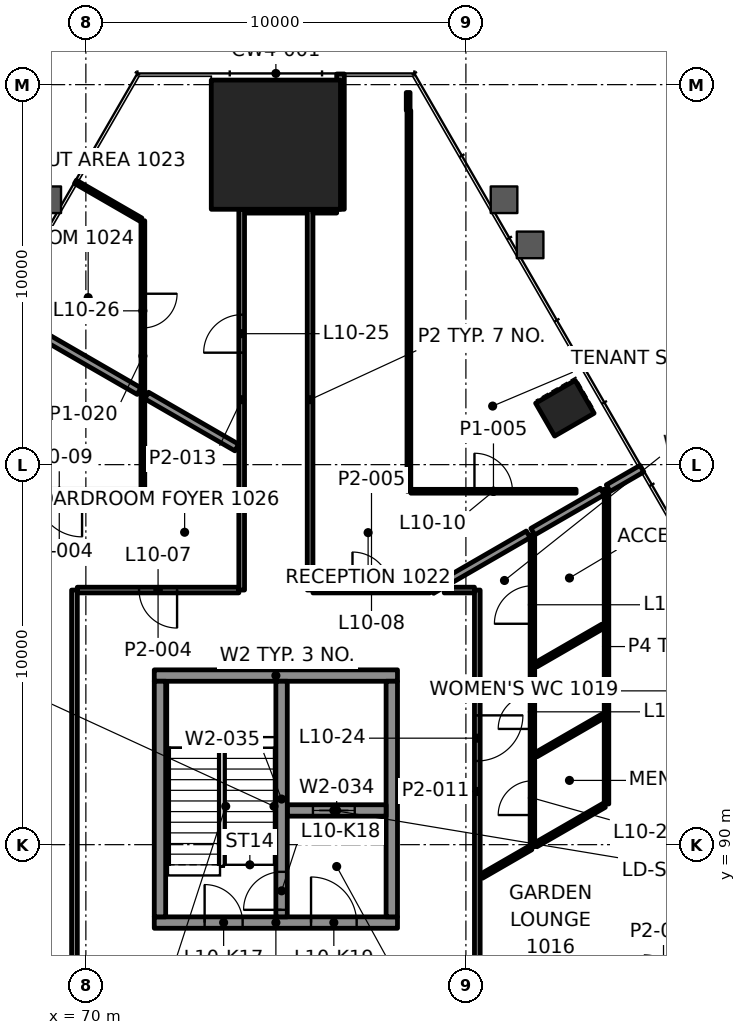
"""IFC4 building model, lengths in metres.
Left out: names, types, materials, properties, quantities, classifications, styles, units other than length and angle.
Written with IfcOpenShell. Run it as: python <this file> out.ifc"""

import sys

from ifc_helpers import new_model, si_unit, direction, frame, frame_2d, origin, origin_2d, place, context, subcontext, project, spatial, rectangle, extrude, element, fill, save


model = new_model("IFC4")
c1 = context("Model", 3, precision=1e-05, world=origin(), true_north=direction((0.0, 1.0)))
c2 = subcontext(c1, "Body", "Model", "MODEL_VIEW")
j1 = project(units=[si_unit("LENGTHUNIT", "METRE"), si_unit("PLANEANGLEUNIT", "RADIAN")], contexts=[c1])
p1 = place(None, origin())
s1 = spatial("IfcSite", under=j1, at=p1, CompositionType="ELEMENT")
p2 = place(p1, origin())
s2 = spatial("IfcBuilding", under=s1, at=p2, CompositionType="ELEMENT")
p3 = place(p2, frame((0.0, 0.0, 48.4)))
s3 = spatial("IfcBuildingStorey", under=s2, at=p3, CompositionType="ELEMENT", Elevation=48.4)
p4 = place(p3, frame((75.0, 108.42, 0.0), z_axis=(0.0, 0.0, 1.0), x_axis=(-1.0, 0.0, 0.0)))
e1 = element("IfcColumn", 1, at=p4, inside=s3, PredefinedType="COLUMN", context=c2, shape_type="SweptSolid", body=[
    extrude(rectangle(XDim=3.4, YDim=3.4, at=origin_2d()), origin(), (0.0, 0.0, 1.0), 4.2),
])
p5 = place(p3, frame((82.604, 101.485, -0.0), z_axis=(0.0, 0.0, 1.0), x_axis=(-0.5, 0.866025403784, 0.0)))
e2 = element("IfcColumn", 2, at=p5, inside=s3, PredefinedType="COLUMN", context=c2, shape_type="SweptSolid", body=[
    extrude(rectangle(XDim=1.0, YDim=1.2, at=origin_2d()), origin(), (0.0, 0.0, 1.0), 4.2),
])
p6 = place(p3, frame((71.8, 87.95, 0.0), z_axis=(0.0, 0.0, 1.0), x_axis=(1.0, 0.0, 0.0)))
e3 = element("IfcWall", 3, at=p6, inside=s3, PredefinedType="SHEAR", context=c2, shape_type="SweptSolid", body=[
    extrude(rectangle(XDim=6.4, YDim=0.3, at=frame_2d((3.2, 0.0))), origin(), (0.0, 0.0, 1.0), 4.0),
])
p7 = place(p6, frame((1.325, 0.0, 0.0)))
e4 = element("IfcOpeningElement", 4, at=p7, cuts=e3, PredefinedType="OPENING", context=c2, shape_type="SweptSolid", body=[
    extrude(rectangle(XDim=1.0, YDim=2.1, at=frame_2d((0.5, 1.05))), frame((0.0, 0.16, 0.0), z_axis=(0.0, -1.0, 0.0), x_axis=(1.0, 0.0, 0.0)), (0.0, 0.0, 1.0), 0.32),
])
p8 = place(p6, frame((4.125, 0.0, 0.0)))
e5 = element("IfcOpeningElement", 5, at=p8, cuts=e3, PredefinedType="OPENING", context=c2, shape_type="SweptSolid", body=[
    extrude(rectangle(XDim=1.2, YDim=2.1, at=frame_2d((0.6, 1.05))), frame((0.0, 0.16, 0.0), z_axis=(0.0, -1.0, 0.0), x_axis=(1.0, 0.0, 0.0)), (0.0, 0.0, 1.0), 0.32),
])
p9 = place(p3, frame((71.8, 94.45, 0.0), z_axis=(0.0, 0.0, 1.0), x_axis=(1.0, 0.0, 0.0)))
e6 = element("IfcWall", 6, at=p9, inside=s3, PredefinedType="SHEAR", context=c2, shape_type="SweptSolid", body=[
    extrude(rectangle(XDim=6.4, YDim=0.3, at=frame_2d((3.2, 0.0))), origin(), (0.0, 0.0, 1.0), 4.0),
])
for number, where, z_axis, x_axis in (
    (7, (71.95, 88.1, 0.0), (0.0, 0.0, 1.0), (0.0, 1.0, 0.0)),
    (8, (78.05, 88.1, 0.0), (0.0, 0.0, 1.0), (0.0, 1.0, 0.0)),
):
    element("IfcWall", number, at=place(p3, frame(where, z_axis=z_axis, x_axis=x_axis)), inside=s3, PredefinedType="SHEAR", context=c2, shape_type="SweptSolid", body=[
        extrude(rectangle(XDim=6.2, YDim=0.3, at=frame_2d((3.1, 0.0))), origin(), (0.0, 0.0, 1.0), 4.0),
    ])
p10 = place(p3, frame((75.3, 90.9, 0.0), z_axis=(0.0, 0.0, 1.0), x_axis=(1.0, 0.0, 0.0)))
e9 = element("IfcWall", 9, at=p10, inside=s3, PredefinedType="SHEAR", context=c2, shape_type="SweptSolid", body=[
    extrude(rectangle(XDim=2.6, YDim=0.3, at=frame_2d((1.3, 0.0))), origin(), (0.0, 0.0, 1.0), 4.0),
])
p11 = place(p10, frame((0.675, 0.0, 0.0)))
e10 = element("IfcOpeningElement", 10, at=p11, cuts=e9, PredefinedType="OPENING", context=c2, shape_type="SweptSolid", body=[
    extrude(rectangle(XDim=1.1, YDim=2.1, at=frame_2d((0.55, 1.05))), frame((0.0, 0.16, 0.0), z_axis=(0.0, -1.0, 0.0), x_axis=(1.0, 0.0, 0.0)), (0.0, 0.0, 1.0), 0.32),
])
p12 = place(p3, frame((75.15, 88.1, 0.0), z_axis=(0.0, 0.0, 1.0), x_axis=(0.0, 1.0, 0.0)))
e11 = element("IfcWall", 11, at=p12, inside=s3, PredefinedType="SHEAR", context=c2, shape_type="SweptSolid", body=[
    extrude(rectangle(XDim=6.2, YDim=0.3, at=frame_2d((3.1, 0.0))), origin(), (0.0, 0.0, 1.0), 4.0),
])
p13 = place(p12, frame((0.185, 0.0, 0.0)))
e12 = element("IfcOpeningElement", 12, at=p13, cuts=e11, PredefinedType="OPENING", context=c2, shape_type="SweptSolid", body=[
    extrude(rectangle(XDim=1.0, YDim=2.1, at=frame_2d((0.5, 1.05))), frame((0.0, 0.16, 0.0), z_axis=(0.0, -1.0, 0.0), x_axis=(1.0, 0.0, 0.0)), (0.0, 0.0, 1.0), 0.32),
])
p14 = place(p3, frame((74.025, 96.7, 0.0), z_axis=(0.0, 0.0, 1.0), x_axis=(-1.0, 0.0, 0.0)))
e13 = element("IfcWall", 13, at=p14, inside=s3, PredefinedType="PARTITIONING", context=c2, shape_type="SweptSolid", body=[
    extrude(rectangle(XDim=4.25, YDim=0.15, at=frame_2d((2.125, 0.0))), origin(), (0.0, 0.0, 1.0), 3.4),
])
p15 = place(p14, frame((1.625, 0.0, 0.0)))
e14 = element("IfcOpeningElement", 14, at=p15, cuts=e13, PredefinedType="OPENING", context=c2, shape_type="SweptSolid", body=[
    extrude(rectangle(XDim=1.0, YDim=2.1, at=frame_2d((0.5, 1.05))), frame((0.0, 0.085, 0.0), z_axis=(0.0, -1.0, 0.0), x_axis=(1.0, 0.0, 0.0)), (0.0, 0.0, 1.0), 0.17),
])
p16 = place(p3, frame((75.975, 96.7, 0.0), z_axis=(0.0, 0.0, 1.0), x_axis=(1.0, 0.0, 0.0)))
e15 = element("IfcWall", 15, at=p16, inside=s3, PredefinedType="PARTITIONING", context=c2, shape_type="SweptSolid", body=[
    extrude(rectangle(XDim=3.082, YDim=0.15, at=frame_2d((1.541, 0.0))), origin(), (0.0, 0.0, 1.0), 3.4),
])
p17 = place(p16, frame((1.041, 0.0, 0.0)))
e16 = element("IfcOpeningElement", 16, at=p17, cuts=e15, PredefinedType="OPENING", context=c2, shape_type="SweptSolid", body=[
    extrude(rectangle(XDim=1.0, YDim=2.1, at=frame_2d((0.5, 1.05))), frame((0.0, 0.085, 0.0), z_axis=(0.0, -1.0, 0.0), x_axis=(1.0, 0.0, 0.0)), (0.0, 0.0, 1.0), 0.17),
])
p18 = place(p3, frame((71.45, 99.3, 0.0), z_axis=(0.0, 0.0, 1.0), x_axis=(-1.0, 0.0, 0.0)))
e17 = element("IfcWall", 17, at=p18, inside=s3, PredefinedType="PARTITIONING", context=c2, shape_type="SweptSolid", body=[
    extrude(rectangle(XDim=4.3, YDim=0.1, at=frame_2d((2.15, 0.0))), origin(), (0.0, 0.0, 1.0), 3.4),
])
p19 = place(p18, frame((1.55, 0.0, 0.0)))
e18 = element("IfcOpeningElement", 18, at=p19, cuts=e17, PredefinedType="OPENING", context=c2, shape_type="SweptSolid", body=[
    extrude(rectangle(XDim=1.2, YDim=2.1, at=frame_2d((0.6, 1.05))), frame((0.0, 0.06, 0.0), z_axis=(0.0, -1.0, 0.0), x_axis=(1.0, 0.0, 0.0)), (0.0, 0.0, 1.0), 0.12),
])
p20 = place(p3, frame((78.551, 99.3, 0.0), z_axis=(0.0, 0.0, 1.0), x_axis=(1.0, 0.0, 0.0)))
e19 = element("IfcWall", 19, at=p20, inside=s3, PredefinedType="PARTITIONING", context=c2, shape_type="SweptSolid", body=[
    extrude(rectangle(XDim=4.349, YDim=0.1, at=frame_2d((2.175, 0.0))), origin(), (0.0, 0.0, 1.0), 3.4),
])
p21 = place(p20, frame((1.675, 0.0, 0.0)))
e20 = element("IfcOpeningElement", 20, at=p21, cuts=e19, PredefinedType="OPENING", context=c2, shape_type="SweptSolid", body=[
    extrude(rectangle(XDim=1.0, YDim=2.1, at=frame_2d((0.5, 1.05))), frame((0.0, 0.06, 0.0), z_axis=(0.0, -1.0, 0.0), x_axis=(1.0, 0.0, 0.0)), (0.0, 0.0, 1.0), 0.12),
])
p22 = place(p3, frame((74.176, 106.72, 0.0), z_axis=(0.0, 0.0, 1.0), x_axis=(1.0, 0.0, 0.0)))
e21 = element("IfcWall", 21, at=p22, inside=s3, PredefinedType="PARTITIONING", context=c2, shape_type="SweptSolid", body=[
    extrude(rectangle(XDim=1.649, YDim=0.2, at=frame_2d((0.825, 0.0))), origin(), (0.0, 0.0, 1.0), 3.397),
])
p23 = place(p3, frame((80.41, 89.17, 0.0), z_axis=(0.0, 0.0, 1.0), x_axis=(0.866055123991, 0.49994851956, 0.0)))
e22 = element("IfcWall", 22, at=p23, inside=s3, PredefinedType="PARTITIONING", context=c2, shape_type="SweptSolid", body=[
    extrude(rectangle(XDim=1.496, YDim=0.12, at=frame_2d((0.748, 0.0))), origin(), (0.0, 0.0, 1.0), 3.4),
])
p24 = place(p3, frame((81.845, 92.366, 0.0), z_axis=(0.0, 0.0, 1.0), x_axis=(0.866069607179, 0.499923429657, 0.0)))
e23 = element("IfcWall", 23, at=p24, inside=s3, PredefinedType="PARTITIONING", context=c2, shape_type="SweptSolid", body=[
    extrude(rectangle(XDim=2.033, YDim=0.12, at=frame_2d((1.017, 0.0))), origin(), (0.0, 0.0, 1.0), 3.4),
])
p25 = place(p3, frame((81.845, 94.733, 0.0), z_axis=(0.0, 0.0, 1.0), x_axis=(0.866017611601, 0.500013496215, 0.0)))
e24 = element("IfcWall", 24, at=p25, inside=s3, PredefinedType="PARTITIONING", context=c2, shape_type="SweptSolid", body=[
    extrude(rectangle(XDim=2.033, YDim=0.12, at=frame_2d((1.017, 0.0))), origin(), (0.0, 0.0, 1.0), 3.4),
])
p26 = place(p3, frame((79.1, 96.7, 0.0), z_axis=(0.0, 0.0, 1.0), x_axis=(0.866031706645, 0.499989082967, 0.0)))
e25 = element("IfcWall", 25, at=p26, inside=s3, PredefinedType="PARTITIONING", context=c2, shape_type="SweptSolid", body=[
    extrude(rectangle(XDim=2.933, YDim=0.2, at=frame_2d((1.466, 0.0))), origin(), (0.0, 0.0, 1.0), 3.4),
])
p27 = place(p3, frame((83.7, 91.07, 0.0), z_axis=(0.0, 0.0, 1.0), x_axis=(0.0, 1.0, 0.0)))
e26 = element("IfcWall", 26, at=p27, inside=s3, PredefinedType="PARTITIONING", context=c2, shape_type="SweptSolid", body=[
    extrude(rectangle(XDim=8.285, YDim=0.12, at=frame_2d((4.143, 0.0))), origin(), (0.0, 0.0, 1.0), 3.165),
])
p28 = place(p3, frame((81.75, 89.944, 0.0), z_axis=(0.0, 0.0, 1.0), x_axis=(0.0, 1.0, 0.0)))
e27 = element("IfcWall", 27, at=p28, inside=s3, PredefinedType="PARTITIONING", context=c2, shape_type="SweptSolid", body=[
    extrude(rectangle(XDim=8.206, YDim=0.12, at=frame_2d((4.103, 0.0))), origin(), (0.0, 0.0, 1.0), 3.4),
])
p29 = place(p28, frame((0.835, 0.0, 0.0)))
e28 = element("IfcOpeningElement", 28, at=p29, cuts=e27, PredefinedType="OPENING", context=c2, shape_type="SweptSolid", body=[
    extrude(rectangle(XDim=0.9, YDim=2.1, at=frame_2d((0.45, 1.05))), frame((0.0, 0.07, 0.0), z_axis=(0.0, -1.0, 0.0), x_axis=(1.0, 0.0, 0.0)), (0.0, 0.0, 1.0), 0.14),
])
p30 = place(p28, frame((3.101, 0.0, 0.0)))
e29 = element("IfcOpeningElement", 29, at=p30, cuts=e27, PredefinedType="OPENING", context=c2, shape_type="SweptSolid", body=[
    extrude(rectangle(XDim=0.9, YDim=2.1, at=frame_2d((0.45, 1.05))), frame((0.0, 0.07, 0.0), z_axis=(0.0, -1.0, 0.0), x_axis=(1.0, 0.0, 0.0)), (0.0, 0.0, 1.0), 0.14),
])
p31 = place(p28, frame((5.869, 0.0, 0.0)))
e30 = element("IfcOpeningElement", 30, at=p31, cuts=e27, PredefinedType="OPENING", context=c2, shape_type="SweptSolid", body=[
    extrude(rectangle(XDim=1.0, YDim=2.1, at=frame_2d((0.5, 1.05))), frame((0.0, 0.07, 0.0), z_axis=(0.0, -1.0, 0.0), x_axis=(1.0, 0.0, 0.0)), (0.0, 0.0, 1.0), 0.14),
])
p32 = place(p3, frame((80.3, 96.7, 0.0), z_axis=(0.0, 0.0, 1.0), x_axis=(0.0, -1.0, 0.0)))
e31 = element("IfcWall", 31, at=p32, inside=s3, PredefinedType="PARTITIONING", context=c2, shape_type="SweptSolid", body=[
    extrude(rectangle(XDim=10.6, YDim=0.15, at=frame_2d((5.3, 0.0))), origin(), (0.0, 0.0, 1.0), 3.4),
])
p33 = place(p32, frame((3.298, 0.0, 0.0)))
e32 = element("IfcOpeningElement", 32, at=p33, cuts=e31, PredefinedType="OPENING", context=c2, shape_type="SweptSolid", body=[
    extrude(rectangle(XDim=1.2, YDim=2.1, at=frame_2d((0.6, 1.05))), frame((0.0, 0.085, 0.0), z_axis=(0.0, -1.0, 0.0), x_axis=(1.0, 0.0, 0.0)), (0.0, 0.0, 1.0), 0.17),
])
p34 = place(p3, frame((78.5, 99.301, 0.0), z_axis=(0.0, 0.0, 1.0), x_axis=(0.0, 1.0, 0.0)))
e33 = element("IfcWall", 33, at=p34, inside=s3, PredefinedType="PARTITIONING", context=c2, shape_type="SweptSolid", body=[
    extrude(rectangle(XDim=10.02, YDim=0.1, at=frame_2d((5.01, 0.0))), origin(), (0.0, 0.0, 1.0), 3.4),
])
p35 = place(p3, frame((78.481, 109.321, 0.0), z_axis=(0.0, 0.0, 1.0), x_axis=(0.0, 1.0, 0.0)))
e34 = element("IfcWall", 34, at=p35, inside=s3, PredefinedType="PARTITIONING", context=c2, shape_type="SweptSolid", body=[
    extrude(rectangle(XDim=0.473, YDim=0.1, at=frame_2d((0.236, 0.0))), origin(), (0.0, 0.0, 1.0), 3.4),
])
p36 = place(p3, frame((76.7, 106.721, 0.0), z_axis=(0.0, 0.0, 1.0), x_axis=(0.0, 1.0, 0.0)))
e35 = element("IfcWall", 35, at=p36, inside=s3, PredefinedType="PARTITIONING", context=c2, shape_type="SweptSolid", body=[
    extrude(rectangle(XDim=3.56, YDim=0.2, at=frame_2d((1.78, 0.0))), origin(), (0.0, 0.0, 1.0), 3.4),
])
p37 = place(p3, frame((75.9, 96.7, 0.0), z_axis=(0.0, 0.0, 1.0), x_axis=(0.0, 1.0, 0.0)))
e36 = element("IfcWall", 36, at=p37, inside=s3, PredefinedType="PARTITIONING", context=c2, shape_type="SweptSolid", body=[
    extrude(rectangle(XDim=10.02, YDim=0.15, at=frame_2d((5.01, 0.0))), origin(), (0.0, 0.0, 1.0), 3.4),
])
p38 = place(p3, frame((74.1, 96.7, 0.0), z_axis=(0.0, 0.0, 1.0), x_axis=(0.0, 1.0, 0.0)))
e37 = element("IfcWall", 37, at=p38, inside=s3, PredefinedType="PARTITIONING", context=c2, shape_type="SweptSolid", body=[
    extrude(rectangle(XDim=10.02, YDim=0.15, at=frame_2d((5.01, 0.0))), origin(), (0.0, 0.0, 1.0), 3.4),
])
p39 = place(p38, frame((6.246, 0.0, 0.0)))
e38 = element("IfcOpeningElement", 38, at=p39, cuts=e37, PredefinedType="OPENING", context=c2, shape_type="SweptSolid", body=[
    extrude(rectangle(XDim=1.0, YDim=2.1, at=frame_2d((0.5, 1.05))), frame((0.0, 0.085, 0.0), z_axis=(0.0, -1.0, 0.0), x_axis=(1.0, 0.0, 0.0)), (0.0, 0.0, 1.0), 0.17),
])
p40 = place(p3, frame((71.5, 106.418, 0.0), z_axis=(0.0, 0.0, 1.0), x_axis=(0.0, -1.0, 0.0)))
e39 = element("IfcWall", 39, at=p40, inside=s3, PredefinedType="PARTITIONING", context=c2, shape_type="SweptSolid", body=[
    extrude(rectangle(XDim=7.118, YDim=0.1, at=frame_2d((3.559, 0.0))), origin(), (0.0, 0.0, 1.0), 3.4),
])
p41 = place(p40, frame((1.921, 0.0, 0.0)))
e40 = element("IfcOpeningElement", 40, at=p41, cuts=e39, PredefinedType="OPENING", context=c2, shape_type="SweptSolid", body=[
    extrude(rectangle(XDim=0.9, YDim=2.1, at=frame_2d((0.45, 1.05))), frame((0.0, 0.06, 0.0), z_axis=(0.0, -1.0, 0.0), x_axis=(1.0, 0.0, 0.0)), (0.0, 0.0, 1.0), 0.12),
])
p42 = place(p3, frame((69.7, 86.1, 0.0), z_axis=(0.0, 0.0, 1.0), x_axis=(0.0, 1.0, 0.0)))
e41 = element("IfcWall", 41, at=p42, inside=s3, PredefinedType="PARTITIONING", context=c2, shape_type="SweptSolid", body=[
    extrude(rectangle(XDim=10.6, YDim=0.15, at=frame_2d((5.3, 0.0))), origin(), (0.0, 0.0, 1.0), 3.4),
])
p43 = place(p3, frame((71.45, 106.447, 0.0), z_axis=(0.0, 0.0, 1.0), x_axis=(-0.866022120267, 0.500005687176, 0.0)))
e42 = element("IfcWall", 42, at=p43, inside=s3, PredefinedType="PARTITIONING", context=c2, shape_type="SweptSolid", body=[
    extrude(rectangle(XDim=1.99, YDim=0.1, at=frame_2d((0.995, 0.0))), origin(), (0.0, 0.0, 1.0), 3.4),
])
p44 = place(p3, frame((73.973, 100.449, 0.0), z_axis=(0.0, 0.0, 1.0), x_axis=(-0.866035715982, 0.499982138324, 0.0)))
e43 = element("IfcWall", 43, at=p44, inside=s3, PredefinedType="PARTITIONING", context=c2, shape_type="SweptSolid", body=[
    extrude(rectangle(XDim=2.74, YDim=0.2, at=frame_2d((1.37, 0.0))), origin(), (0.0, 0.0, 1.0), 3.4),
])
p45 = place(p3, frame((69.599, 86.404, 0.0), z_axis=(0.0, 0.0, 1.0), x_axis=(-0.866034815185, 0.499983698621, 0.0)))
e44 = element("IfcWall", 44, at=p45, inside=s3, PredefinedType="PARTITIONING", context=c2, shape_type="SweptSolid", body=[
    extrude(rectangle(XDim=10.408, YDim=0.1, at=frame_2d((5.204, 0.0))), origin(), (0.0, 0.0, 1.0), 3.165),
])
p46 = place(p3, frame((79.429, 96.7, 0.0), z_axis=(0.0, 0.0, 1.0), x_axis=(1.0, 0.0, 0.0)))
e45 = element("IfcWall", 45, at=p46, inside=s3, PredefinedType="PARTITIONING", context=c2, shape_type="SweptSolid", body=[
    extrude(rectangle(XDim=0.796, YDim=0.15, at=frame_2d((0.398, 0.0))), origin(), (0.0, 0.0, 1.0), 3.4),
])
p47 = place(p3, frame((75.975, 106.72, 0.0), z_axis=(0.0, 0.0, 1.0), x_axis=(1.0, 0.0, 0.0)))
e46 = element("IfcWall", 46, at=p47, inside=s3, PredefinedType="PARTITIONING", context=c2, shape_type="SweptSolid", body=[
    extrude(rectangle(XDim=0.625, YDim=0.2, at=frame_2d((0.312, 0.0))), origin(), (0.0, 0.0, 1.0), 3.4),
])
p48 = place(p3, frame((81.84, 89.996, 0.0), z_axis=(0.0, 0.0, 1.0), x_axis=(0.866015411258, 0.500017307165, 0.0)))
e47 = element("IfcWall", 47, at=p48, inside=s3, PredefinedType="PARTITIONING", context=c2, shape_type="SweptSolid", body=[
    extrude(rectangle(XDim=2.079, YDim=0.12, at=frame_2d((1.039, 0.0))), origin(), (0.0, 0.0, 1.0), 3.4),
])
p49 = place(p3, frame((83.745, 99.382, 0.0), z_axis=(0.0, 0.0, 1.0), x_axis=(0.866062461731, 0.499935808259, 0.0)))
e48 = element("IfcWall", 48, at=p49, inside=s3, PredefinedType="PARTITIONING", context=c2, shape_type="SweptSolid", body=[
    extrude(rectangle(XDim=1.024, YDim=0.2, at=frame_2d((0.512, 0.0))), origin(), (0.0, 0.0, 1.0), 3.165),
])
p50 = place(p3, frame((71.4, 101.935, 0.0), z_axis=(0.0, 0.0, 1.0), x_axis=(-0.866003715822, 0.500037562771, 0.0)))
e49 = element("IfcWall", 49, at=p50, inside=s3, PredefinedType="PARTITIONING", context=c2, shape_type="SweptSolid", body=[
    extrude(rectangle(XDim=4.203, YDim=0.2, at=frame_2d((2.102, 0.0))), origin(), (0.0, 0.0, 1.0), 3.4),
])
p51 = place(p3, frame((81.76, 98.236, 0.0), z_axis=(0.0, 0.0, 1.0), x_axis=(0.866037425094, 0.499979177903, 0.0)))
e50 = element("IfcWall", 50, at=p51, inside=s3, PredefinedType="PARTITIONING", context=c2, shape_type="SweptSolid", body=[
    extrude(rectangle(XDim=2.113, YDim=0.2, at=frame_2d((1.056, 0.0))), origin(), (0.0, 0.0, 1.0), 3.4),
])
p52 = place(p15, origin())
e51 = element("IfcDoor", 51, at=p52, inside=s3, OperationType="SINGLE_SWING_RIGHT", PredefinedType="DOOR", context=c2, shape_type="SweptSolid", body=[
    extrude(rectangle(XDim=1.0, YDim=2.1, at=frame_2d((0.5, 1.05))), frame((0.0, 0.025, 0.0), z_axis=(0.0, -1.0, 0.0), x_axis=(1.0, 0.0, 0.0)), (0.0, 0.0, 1.0), 0.05),
])
fill(e14, e51)
p53 = place(p17, origin())
e52 = element("IfcDoor", 52, at=p53, inside=s3, OperationType="SINGLE_SWING_LEFT", PredefinedType="DOOR", context=c2, shape_type="SweptSolid", body=[
    extrude(rectangle(XDim=1.0, YDim=2.1, at=frame_2d((0.5, 1.05))), frame((0.0, 0.025, 0.0), z_axis=(0.0, -1.0, 0.0), x_axis=(1.0, 0.0, 0.0)), (0.0, 0.0, 1.0), 0.05),
])
fill(e16, e52)
p54 = place(p19, origin())
e53 = element("IfcDoor", 53, at=p54, inside=s3, OperationType="DOUBLE_DOOR_SINGLE_SWING", PredefinedType="DOOR", context=c2, shape_type="SweptSolid", body=[
    extrude(rectangle(XDim=1.2, YDim=2.1, at=frame_2d((0.6, 1.05))), frame((0.0, 0.025, 0.0), z_axis=(0.0, -1.0, 0.0), x_axis=(1.0, 0.0, 0.0)), (0.0, 0.0, 1.0), 0.05),
])
fill(e18, e53)
p55 = place(p21, origin())
e54 = element("IfcDoor", 54, at=p55, inside=s3, OperationType="SINGLE_SWING_RIGHT", PredefinedType="DOOR", context=c2, shape_type="SweptSolid", body=[
    extrude(rectangle(XDim=1.0, YDim=2.1, at=frame_2d((0.5, 1.05))), frame((0.0, 0.025, 0.0), z_axis=(0.0, -1.0, 0.0), x_axis=(1.0, 0.0, 0.0)), (0.0, 0.0, 1.0), 0.05),
])
fill(e20, e54)
p56 = place(p29, origin())
e55 = element("IfcDoor", 55, at=p56, inside=s3, OperationType="SINGLE_SWING_LEFT", PredefinedType="DOOR", context=c2, shape_type="SweptSolid", body=[
    extrude(rectangle(XDim=0.9, YDim=2.1, at=frame_2d((0.45, 1.05))), frame((0.0, 0.025, 0.0), z_axis=(0.0, -1.0, 0.0), x_axis=(1.0, 0.0, 0.0)), (0.0, 0.0, 1.0), 0.05),
])
fill(e28, e55)
p57 = place(p30, origin())
e56 = element("IfcDoor", 56, at=p57, inside=s3, OperationType="SINGLE_SWING_RIGHT", PredefinedType="DOOR", context=c2, shape_type="SweptSolid", body=[
    extrude(rectangle(XDim=0.9, YDim=2.1, at=frame_2d((0.45, 1.05))), frame((0.0, 0.025, 0.0), z_axis=(0.0, -1.0, 0.0), x_axis=(1.0, 0.0, 0.0)), (0.0, 0.0, 1.0), 0.05),
])
fill(e29, e56)
p58 = place(p31, origin())
e57 = element("IfcDoor", 57, at=p58, inside=s3, OperationType="SINGLE_SWING_LEFT", PredefinedType="DOOR", context=c2, shape_type="SweptSolid", body=[
    extrude(rectangle(XDim=1.0, YDim=2.1, at=frame_2d((0.5, 1.05))), frame((0.0, 0.025, 0.0), z_axis=(0.0, -1.0, 0.0), x_axis=(1.0, 0.0, 0.0)), (0.0, 0.0, 1.0), 0.05),
])
fill(e30, e57)
p59 = place(p33, origin())
e58 = element("IfcDoor", 58, at=p59, inside=s3, OperationType="DOUBLE_DOOR_SINGLE_SWING", PredefinedType="DOOR", context=c2, shape_type="SweptSolid", body=[
    extrude(rectangle(XDim=1.2, YDim=2.1, at=frame_2d((0.6, 1.05))), frame((0.0, 0.025, 0.0), z_axis=(0.0, -1.0, 0.0), x_axis=(1.0, 0.0, 0.0)), (0.0, 0.0, 1.0), 0.05),
])
fill(e32, e58)
p60 = place(p39, origin())
e59 = element("IfcDoor", 59, at=p60, inside=s3, OperationType="SINGLE_SWING_RIGHT", PredefinedType="DOOR", context=c2, shape_type="SweptSolid", body=[
    extrude(rectangle(XDim=1.0, YDim=2.1, at=frame_2d((0.5, 1.05))), frame((0.0, 0.025, 0.0), z_axis=(0.0, -1.0, 0.0), x_axis=(1.0, 0.0, 0.0)), (0.0, 0.0, 1.0), 0.05),
])
fill(e38, e59)
p61 = place(p41, origin())
e60 = element("IfcDoor", 60, at=p61, inside=s3, OperationType="SINGLE_SWING_RIGHT", PredefinedType="DOOR", context=c2, shape_type="SweptSolid", body=[
    extrude(rectangle(XDim=0.9, YDim=2.1, at=frame_2d((0.45, 1.05))), frame((0.0, 0.025, 0.0), z_axis=(0.0, -1.0, 0.0), x_axis=(1.0, 0.0, 0.0)), (0.0, 0.0, 1.0), 0.05),
])
fill(e40, e60)
p62 = place(p11, origin())
e61 = element("IfcDoor", 61, at=p62, inside=s3, OperationType="DOUBLE_DOOR_SLIDING", PredefinedType="DOOR", context=c2, shape_type="SweptSolid", body=[
    extrude(rectangle(XDim=1.1, YDim=2.1, at=frame_2d((0.55, 1.05))), frame((0.0, 0.025, 0.0), z_axis=(0.0, -1.0, 0.0), x_axis=(1.0, 0.0, 0.0)), (0.0, 0.0, 1.0), 0.05),
])
fill(e10, e61)
p63 = place(p7, origin())
e62 = element("IfcDoor", 62, at=p63, inside=s3, OperationType="SINGLE_SWING_RIGHT", PredefinedType="DOOR", context=c2, shape_type="SweptSolid", body=[
    extrude(rectangle(XDim=1.0, YDim=2.1, at=frame_2d((0.5, 1.05))), frame((0.0, 0.025, 0.0), z_axis=(0.0, -1.0, 0.0), x_axis=(1.0, 0.0, 0.0)), (0.0, 0.0, 1.0), 0.05),
])
fill(e4, e62)
p64 = place(p13, origin())
e63 = element("IfcDoor", 63, at=p64, inside=s3, OperationType="SINGLE_SWING_LEFT", PredefinedType="DOOR", context=c2, shape_type="SweptSolid", body=[
    extrude(rectangle(XDim=1.0, YDim=2.1, at=frame_2d((0.5, 1.05))), frame((0.0, 0.025, 0.0), z_axis=(0.0, -1.0, 0.0), x_axis=(1.0, 0.0, 0.0)), (0.0, 0.0, 1.0), 0.05),
])
fill(e12, e63)
p65 = place(p8, origin())
e64 = element("IfcDoor", 64, at=p65, inside=s3, OperationType="SINGLE_SWING_RIGHT", PredefinedType="DOOR", context=c2, shape_type="SweptSolid", body=[
    extrude(rectangle(XDim=1.2, YDim=2.1, at=frame_2d((0.6, 1.05))), frame((0.0, 0.025, 0.0), z_axis=(0.0, -1.0, 0.0), x_axis=(1.0, 0.0, 0.0)), (0.0, 0.0, 1.0), 0.05),
])
fill(e5, e64)
save(model, sys.argv[1])
